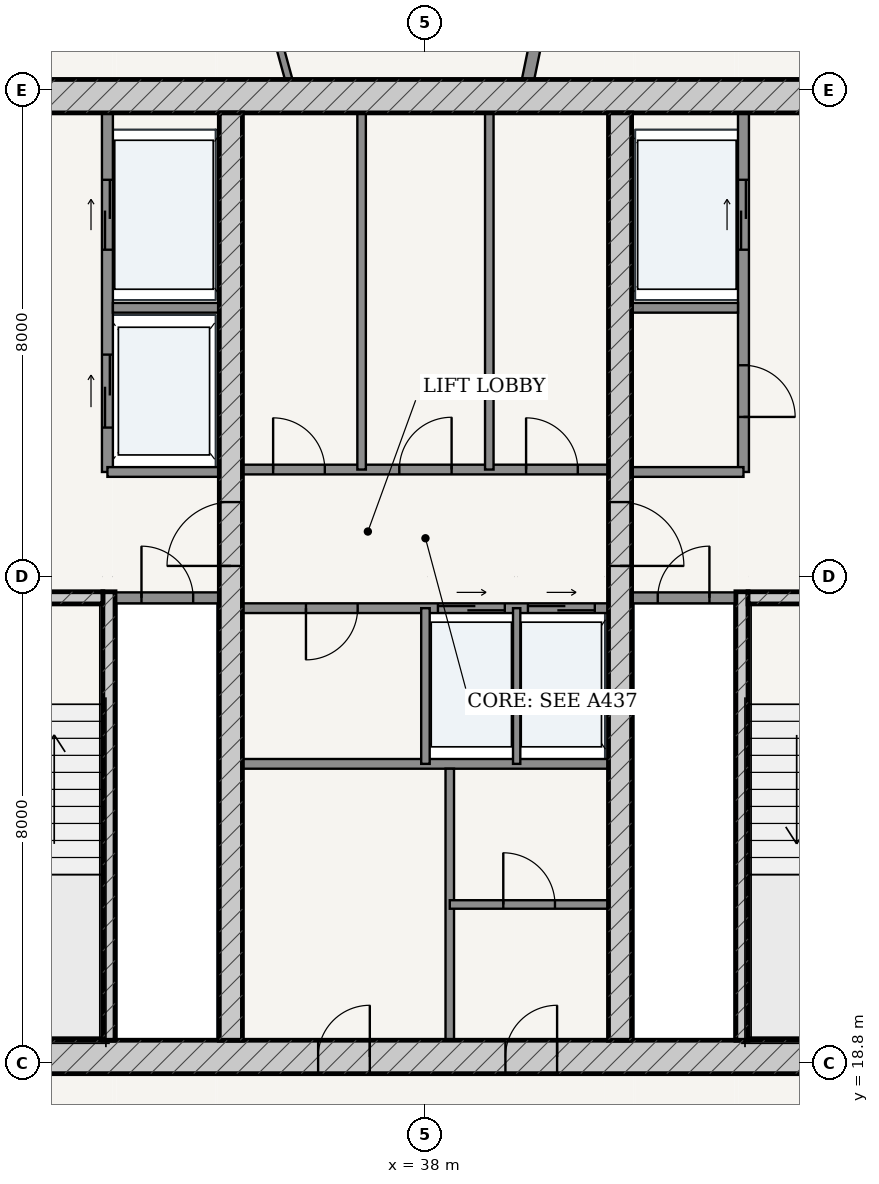
"""IFC4 building model, lengths in metres.
Left out: names, types, materials, properties, quantities, classifications, styles, units other than length and angle.
Written with IfcOpenShell. Run it as: python <this file> out.ifc"""

import sys

from ifc_helpers import new_model, si_unit, direction, frame, frame_2d, origin, place, context, subcontext, project, spatial, rectangle, extrude, source, transform, mapped, element, fill, save


model = new_model("IFC4")
c1 = context("Model", 3, precision=1e-05, world=origin(), true_north=direction((-0.2419218956, 0.970295726276)))
c2 = subcontext(c1, "Body", "Model", "MODEL_VIEW")
j1 = project(units=[si_unit("LENGTHUNIT", "METRE"), si_unit("PLANEANGLEUNIT", "RADIAN")], contexts=[c1])
p1 = place(None, origin())
s1 = spatial("IfcSite", under=j1, at=p1, CompositionType="ELEMENT")
p2 = place(p1, origin())
s2 = spatial("IfcBuilding", under=s1, at=p2, CompositionType="ELEMENT")
p3 = place(p2, frame((0.0, 0.0, 289.45)))
s3 = spatial("IfcBuildingStorey", under=s2, at=p3, CompositionType="ELEMENT", Elevation=289.45)
p4 = place(p3, frame((28.825, 18.9, 0.0), z_axis=(0.0, 0.0, 1.0), x_axis=(1.0, 0.0, 0.0)))
e1 = element("IfcWall", 1, at=p4, inside=s3, PredefinedType="SHEAR", context=c2, shape_type="SweptSolid", body=[
    extrude(rectangle(XDim=18.35, YDim=0.55, at=frame_2d((9.175, 0.0))), origin(), (0.0, 0.0, 1.0), 3.49),
])
p5 = place(p4, frame((7.41, 0.0, 0.0)))
e2 = element("IfcOpeningElement", 2, at=p5, cuts=e1, PredefinedType="OPENING", context=c2, shape_type="SweptSolid", body=[
    extrude(rectangle(XDim=0.85, YDim=2.1, at=frame_2d((0.425, 1.05))), frame((0.0, 0.285, 0.0), z_axis=(0.0, -1.0, 0.0), x_axis=(1.0, 0.0, 0.0)), (0.0, 0.0, 1.0), 0.57),
])
p6 = place(p4, frame((10.49, 0.0, 0.0)))
e3 = element("IfcOpeningElement", 3, at=p6, cuts=e1, PredefinedType="OPENING", context=c2, shape_type="SweptSolid", body=[
    extrude(rectangle(XDim=0.85, YDim=2.1, at=frame_2d((0.425, 1.05))), frame((0.0, 0.285, 0.0), z_axis=(0.0, -1.0, 0.0), x_axis=(1.0, 0.0, 0.0)), (0.0, 0.0, 1.0), 0.57),
])
p7 = place(p3, frame((28.825, 34.7, 0.0), z_axis=(0.0, 0.0, 1.0), x_axis=(1.0, 0.0, 0.0)))
e4 = element("IfcWall", 4, at=p7, inside=s3, PredefinedType="SHEAR", context=c2, shape_type="SweptSolid", body=[
    extrude(rectangle(XDim=18.35, YDim=0.55, at=frame_2d((9.175, 0.0))), origin(), (0.0, 0.0, 1.0), 3.49),
])
p8 = place(p3, frame((32.795, 19.175, 0.0), z_axis=(0.0, 0.0, 1.0), x_axis=(0.0, 1.0, 0.0)))
e5 = element("IfcWall", 5, at=p8, inside=s3, PredefinedType="SOLIDWALL", context=c2, shape_type="SweptSolid", body=[
    extrude(rectangle(XDim=7.375, YDim=0.2, at=frame_2d((3.688, 0.0))), origin(), (0.0, 0.0, 1.0), 3.49),
])
p9 = place(p3, frame((29.375, 26.45, 0.0), z_axis=(0.0, 0.0, 1.0), x_axis=(1.0, 0.0, 0.0)))
e6 = element("IfcWall", 6, at=p9, inside=s3, PredefinedType="SOLIDWALL", context=c2, shape_type="SweptSolid", body=[
    extrude(rectangle(XDim=3.32, YDim=0.2, at=frame_2d((1.66, 0.0))), origin(), (0.0, 0.0, 1.0), 3.49),
])
p10 = place(p9, frame((1.185, 0.0, 0.0)))
e7 = element("IfcOpeningElement", 7, at=p10, cuts=e6, PredefinedType="OPENING", context=c2, shape_type="SweptSolid", body=[
    extrude(rectangle(XDim=0.95, YDim=2.15, at=frame_2d((0.475, 1.075))), frame((0.0, 0.11, 0.0), z_axis=(0.0, -1.0, 0.0), x_axis=(1.0, 0.0, 0.0)), (0.0, 0.0, 1.0), 0.22),
])
p11 = place(p3, frame((43.205, 19.175, 0.0), z_axis=(0.0, 0.0, 1.0), x_axis=(0.0, 1.0, 0.0)))
e8 = element("IfcWall", 8, at=p11, inside=s3, PredefinedType="SOLIDWALL", context=c2, shape_type="SweptSolid", body=[
    extrude(rectangle(XDim=7.375, YDim=0.2, at=frame_2d((3.688, 0.0))), origin(), (0.0, 0.0, 1.0), 3.49),
])
p12 = place(p3, frame((43.305, 26.45, 0.0), z_axis=(0.0, 0.0, 1.0), x_axis=(1.0, 0.0, 0.0)))
e9 = element("IfcWall", 9, at=p12, inside=s3, PredefinedType="SOLIDWALL", context=c2, shape_type="SweptSolid", body=[
    extrude(rectangle(XDim=3.32, YDim=0.2, at=frame_2d((1.66, 0.0))), origin(), (0.0, 0.0, 1.0), 3.49),
])
p13 = place(p12, frame((1.185, 0.0, 0.0)))
e10 = element("IfcOpeningElement", 10, at=p13, cuts=e9, PredefinedType="OPENING", context=c2, shape_type="SweptSolid", body=[
    extrude(rectangle(XDim=0.95, YDim=2.15, at=frame_2d((0.475, 1.075))), frame((0.0, 0.11, 0.0), z_axis=(0.0, -1.0, 0.0), x_axis=(1.0, 0.0, 0.0)), (0.0, 0.0, 1.0), 0.22),
])
p14 = place(p3, frame((34.8, 19.175, 0.0), z_axis=(0.0, 0.0, 1.0), x_axis=(0.0, 1.0, 0.0)))
e11 = element("IfcWall", 11, at=p14, inside=s3, PredefinedType="SHEAR", context=c2, shape_type="SweptSolid", body=[
    extrude(rectangle(XDim=15.25, YDim=0.38, at=frame_2d((7.625, 0.0))), origin(), (0.0, 0.0, 1.0), 3.49),
])
p15 = place(p14, frame((7.8, 0.0, 0.0)))
e12 = element("IfcOpeningElement", 12, at=p15, cuts=e11, PredefinedType="OPENING", context=c2, shape_type="SweptSolid", body=[
    extrude(rectangle(XDim=1.05, YDim=2.15, at=frame_2d((0.525, 1.075))), frame((0.0, 0.2, 0.0), z_axis=(0.0, -1.0, 0.0), x_axis=(1.0, 0.0, 0.0)), (0.0, 0.0, 1.0), 0.4),
])
p16 = place(p3, frame((41.2, 19.175, 0.0), z_axis=(0.0, 0.0, 1.0), x_axis=(0.0, 1.0, 0.0)))
e13 = element("IfcWall", 13, at=p16, inside=s3, PredefinedType="SHEAR", context=c2, shape_type="SweptSolid", body=[
    extrude(rectangle(XDim=15.25, YDim=0.38, at=frame_2d((7.625, 0.0))), origin(), (0.0, 0.0, 1.0), 3.49),
])
p17 = place(p16, frame((7.8, 0.0, 0.0)))
e14 = element("IfcOpeningElement", 14, at=p17, cuts=e13, PredefinedType="OPENING", context=c2, shape_type="SweptSolid", body=[
    extrude(rectangle(XDim=1.05, YDim=2.15, at=frame_2d((0.525, 1.075))), frame((0.0, 0.2, 0.0), z_axis=(0.0, -1.0, 0.0), x_axis=(1.0, 0.0, 0.0)), (0.0, 0.0, 1.0), 0.4),
])
p18 = place(p3, frame((32.9, 26.45, 0.0), z_axis=(0.0, 0.0, 1.0), x_axis=(1.0, 0.0, 0.0)))
e15 = element("IfcWall", 15, at=p18, inside=s3, PredefinedType="PARTITIONING", context=c2, shape_type="SweptSolid", body=[
    extrude(rectangle(XDim=1.71, YDim=0.18, at=frame_2d((0.855, 0.0))), origin(), (0.0, 0.0, 1.0), 3.49),
])
p19 = place(p18, frame((0.43, 0.0, 0.0)))
e16 = element("IfcOpeningElement", 16, at=p19, cuts=e15, PredefinedType="OPENING", context=c2, shape_type="SweptSolid", body=[
    extrude(rectangle(XDim=0.85, YDim=2.1, at=frame_2d((0.425, 1.05))), frame((0.0, 0.1, 0.0), z_axis=(0.0, -1.0, 0.0), x_axis=(1.0, 0.0, 0.0)), (0.0, 0.0, 1.0), 0.2),
])
p20 = place(p3, frame((41.39, 26.45, 0.0), z_axis=(0.0, 0.0, 1.0), x_axis=(1.0, 0.0, 0.0)))
e17 = element("IfcWall", 17, at=p20, inside=s3, PredefinedType="PARTITIONING", context=c2, shape_type="SweptSolid", body=[
    extrude(rectangle(XDim=1.71, YDim=0.18, at=frame_2d((0.855, 0.0))), origin(), (0.0, 0.0, 1.0), 3.49),
])
p21 = place(p20, frame((0.43, 0.0, 0.0)))
e18 = element("IfcOpeningElement", 18, at=p21, cuts=e17, PredefinedType="OPENING", context=c2, shape_type="SweptSolid", body=[
    extrude(rectangle(XDim=0.85, YDim=2.1, at=frame_2d((0.425, 1.05))), frame((0.0, 0.1, 0.0), z_axis=(0.0, -1.0, 0.0), x_axis=(1.0, 0.0, 0.0)), (0.0, 0.0, 1.0), 0.2),
])
p22 = place(p3, frame((32.77, 28.52, 0.0), z_axis=(0.0, 0.0, 1.0), x_axis=(0.0, 1.0, 0.0)))
e19 = element("IfcWall", 19, at=p22, inside=s3, PredefinedType="PARTITIONING", context=c2, shape_type="SweptSolid", body=[
    extrude(rectangle(XDim=5.905, YDim=0.18, at=frame_2d((2.953, 0.0))), origin(), (0.0, 0.0, 1.0), 3.49),
])
p23 = place(p22, frame((3.655, 0.0, 0.0)))
e20 = element("IfcOpeningElement", 20, at=p23, cuts=e19, PredefinedType="OPENING", context=c2, shape_type="SweptSolid", body=[
    extrude(rectangle(XDim=1.15, YDim=2.2, at=frame_2d((0.575, 1.1))), frame((0.0, 0.1, 0.0), z_axis=(0.0, -1.0, 0.0), x_axis=(1.0, 0.0, 0.0)), (0.0, 0.0, 1.0), 0.2),
])
p24 = place(p22, frame((0.73, 0.0, 0.0)))
e21 = element("IfcOpeningElement", 21, at=p24, cuts=e19, PredefinedType="OPENING", context=c2, shape_type="SweptSolid", body=[
    extrude(rectangle(XDim=1.2, YDim=2.25, at=frame_2d((0.6, 1.125))), frame((0.0, 0.1, 0.0), z_axis=(0.0, -1.0, 0.0), x_axis=(1.0, 0.0, 0.0)), (0.0, 0.0, 1.0), 0.2),
])
p25 = place(p3, frame((32.86, 31.22, 0.0), z_axis=(0.0, 0.0, 1.0), x_axis=(1.0, 0.0, 0.0)))
e22 = element("IfcWall", 22, at=p25, inside=s3, PredefinedType="PARTITIONING", context=c2, shape_type="SweptSolid", body=[
    extrude(rectangle(XDim=1.75, YDim=0.16, at=frame_2d((0.875, 0.0))), origin(), (0.0, 0.0, 1.0), 3.49),
])
p26 = place(p3, frame((32.77, 28.52, 0.0), z_axis=(0.0, 0.0, 1.0), x_axis=(1.0, 0.0, 0.0)))
e23 = element("IfcWall", 23, at=p26, inside=s3, PredefinedType="PARTITIONING", context=c2, shape_type="SweptSolid", body=[
    extrude(rectangle(XDim=1.84, YDim=0.16, at=frame_2d((0.92, 0.0))), origin(), (0.0, 0.0, 1.0), 3.49),
])
p27 = place(p3, frame((43.23, 28.52, 0.0), z_axis=(0.0, 0.0, 1.0), x_axis=(0.0, 1.0, 0.0)))
e24 = element("IfcWall", 24, at=p27, inside=s3, PredefinedType="PARTITIONING", context=c2, shape_type="SweptSolid", body=[
    extrude(rectangle(XDim=5.905, YDim=0.18, at=frame_2d((2.953, 0.0))), origin(), (0.0, 0.0, 1.0), 3.49),
])
p28 = place(p27, frame((0.905, 0.0, 0.0)))
e25 = element("IfcOpeningElement", 25, at=p28, cuts=e24, PredefinedType="OPENING", context=c2, shape_type="SweptSolid", body=[
    extrude(rectangle(XDim=0.85, YDim=2.1, at=frame_2d((0.425, 1.05))), frame((0.0, 0.1, 0.0), z_axis=(0.0, -1.0, 0.0), x_axis=(1.0, 0.0, 0.0)), (0.0, 0.0, 1.0), 0.2),
])
p29 = place(p27, frame((3.655, 0.0, 0.0)))
e26 = element("IfcOpeningElement", 26, at=p29, cuts=e24, PredefinedType="OPENING", context=c2, shape_type="SweptSolid", body=[
    extrude(rectangle(XDim=1.15, YDim=2.2, at=frame_2d((0.575, 1.1))), frame((0.0, 0.1, 0.0), z_axis=(0.0, -1.0, 0.0), x_axis=(1.0, 0.0, 0.0)), (0.0, 0.0, 1.0), 0.2),
])
p30 = place(p3, frame((41.39, 31.22, 0.0), z_axis=(0.0, 0.0, 1.0), x_axis=(1.0, 0.0, 0.0)))
e27 = element("IfcWall", 27, at=p30, inside=s3, PredefinedType="PARTITIONING", context=c2, shape_type="SweptSolid", body=[
    extrude(rectangle(XDim=1.75, YDim=0.16, at=frame_2d((0.875, 0.0))), origin(), (0.0, 0.0, 1.0), 3.49),
])
p31 = place(p3, frame((41.39, 28.52, 0.0), z_axis=(0.0, 0.0, 1.0), x_axis=(1.0, 0.0, 0.0)))
e28 = element("IfcWall", 28, at=p31, inside=s3, PredefinedType="PARTITIONING", context=c2, shape_type="SweptSolid", body=[
    extrude(rectangle(XDim=1.84, YDim=0.16, at=frame_2d((0.92, 0.0))), origin(), (0.0, 0.0, 1.0), 3.49),
])
p32 = place(p3, frame((34.99, 28.56, 0.0), z_axis=(0.0, 0.0, 1.0), x_axis=(1.0, 0.0, 0.0)))
e29 = element("IfcWall", 29, at=p32, inside=s3, PredefinedType="PARTITIONING", context=c2, shape_type="SweptSolid", body=[
    extrude(rectangle(XDim=6.02, YDim=0.16, at=frame_2d((3.01, 0.0))), origin(), (0.0, 0.0, 1.0), 3.49),
])
p33 = place(p32, frame((0.505, 0.0, 0.0)))
e30 = element("IfcOpeningElement", 30, at=p33, cuts=e29, PredefinedType="OPENING", context=c2, shape_type="SweptSolid", body=[
    extrude(rectangle(XDim=0.85, YDim=2.1, at=frame_2d((0.425, 1.05))), frame((0.0, 0.09, 0.0), z_axis=(0.0, -1.0, 0.0), x_axis=(1.0, 0.0, 0.0)), (0.0, 0.0, 1.0), 0.18),
])
p34 = place(p32, frame((2.58, 0.0, 0.0)))
e31 = element("IfcOpeningElement", 31, at=p34, cuts=e29, PredefinedType="OPENING", context=c2, shape_type="SweptSolid", body=[
    extrude(rectangle(XDim=0.86, YDim=2.1, at=frame_2d((0.43, 1.05))), frame((0.0, 0.09, 0.0), z_axis=(0.0, -1.0, 0.0), x_axis=(1.0, 0.0, 0.0)), (0.0, 0.0, 1.0), 0.18),
])
p35 = place(p32, frame((4.665, 0.0, 0.0)))
e32 = element("IfcOpeningElement", 32, at=p35, cuts=e29, PredefinedType="OPENING", context=c2, shape_type="SweptSolid", body=[
    extrude(rectangle(XDim=0.85, YDim=2.1, at=frame_2d((0.425, 1.05))), frame((0.0, 0.09, 0.0), z_axis=(0.0, -1.0, 0.0), x_axis=(1.0, 0.0, 0.0)), (0.0, 0.0, 1.0), 0.18),
])
for number, where, z_axis, x_axis in (
    (33, (36.95, 28.56, 0.0), (0.0, 0.0, 1.0), (0.0, 1.0, 0.0)),
    (34, (39.05, 28.56, 0.0), (0.0, 0.0, 1.0), (0.0, 1.0, 0.0)),
):
    element("IfcWall", number, at=place(p3, frame(where, z_axis=z_axis, x_axis=x_axis)), inside=s3, PredefinedType="PARTITIONING", context=c2, shape_type="SweptSolid", body=[
        extrude(rectangle(XDim=5.865, YDim=0.14, at=frame_2d((2.933, 0.0))), origin(), (0.0, 0.0, 1.0), 3.49),
    ])
p36 = place(p3, frame((34.99, 26.28, 0.0), z_axis=(0.0, 0.0, 1.0), x_axis=(1.0, 0.0, 0.0)))
e35 = element("IfcWall", 35, at=p36, inside=s3, PredefinedType="PARTITIONING", context=c2, shape_type="SweptSolid", body=[
    extrude(rectangle(XDim=6.02, YDim=0.16, at=frame_2d((3.01, 0.0))), origin(), (0.0, 0.0, 1.0), 3.49),
])
p37 = place(p36, frame((1.045, 0.0, 0.0)))
e36 = element("IfcOpeningElement", 36, at=p37, cuts=e35, PredefinedType="OPENING", context=c2, shape_type="SweptSolid", body=[
    extrude(rectangle(XDim=0.85, YDim=2.1, at=frame_2d((0.425, 1.05))), frame((0.0, 0.09, 0.0), z_axis=(0.0, -1.0, 0.0), x_axis=(1.0, 0.0, 0.0)), (0.0, 0.0, 1.0), 0.18),
])
p38 = place(p36, frame((3.215, 0.0, 0.0)))
e37 = element("IfcOpeningElement", 37, at=p38, cuts=e35, PredefinedType="OPENING", context=c2, shape_type="SweptSolid", body=[
    extrude(rectangle(XDim=1.1, YDim=2.2, at=frame_2d((0.55, 1.1))), frame((0.0, 0.09, 0.0), z_axis=(0.0, -1.0, 0.0), x_axis=(1.0, 0.0, 0.0)), (0.0, 0.0, 1.0), 0.18),
])
p39 = place(p36, frame((4.695, 0.0, 0.0)))
e38 = element("IfcOpeningElement", 38, at=p39, cuts=e35, PredefinedType="OPENING", context=c2, shape_type="SweptSolid", body=[
    extrude(rectangle(XDim=1.1, YDim=2.2, at=frame_2d((0.55, 1.1))), frame((0.0, 0.09, 0.0), z_axis=(0.0, -1.0, 0.0), x_axis=(1.0, 0.0, 0.0)), (0.0, 0.0, 1.0), 0.18),
])
p40 = place(p3, frame((34.99, 23.72, 0.0), z_axis=(0.0, 0.0, 1.0), x_axis=(1.0, 0.0, 0.0)))
e39 = element("IfcWall", 39, at=p40, inside=s3, PredefinedType="PARTITIONING", context=c2, shape_type="SweptSolid", body=[
    extrude(rectangle(XDim=6.02, YDim=0.16, at=frame_2d((3.01, 0.0))), origin(), (0.0, 0.0, 1.0), 3.49),
])
p41 = place(p3, frame((38.0, 23.72, 0.0), z_axis=(0.0, 0.0, 1.0), x_axis=(0.0, 1.0, 0.0)))
e40 = element("IfcWall", 40, at=p41, inside=s3, PredefinedType="PARTITIONING", context=c2, shape_type="SweptSolid", body=[
    extrude(rectangle(XDim=2.56, YDim=0.14, at=frame_2d((1.28, 0.0))), origin(), (0.0, 0.0, 1.0), 3.49),
])
p42 = place(p3, frame((39.5, 23.72, 0.0), z_axis=(0.0, 0.0, 1.0), x_axis=(0.0, 1.0, 0.0)))
e41 = element("IfcWall", 41, at=p42, inside=s3, PredefinedType="PARTITIONING", context=c2, shape_type="SweptSolid", body=[
    extrude(rectangle(XDim=2.56, YDim=0.12, at=frame_2d((1.28, 0.0))), origin(), (0.0, 0.0, 1.0), 3.49),
])
p43 = place(p3, frame((38.4, 19.175, 0.0), z_axis=(0.0, 0.0, 1.0), x_axis=(0.0, 1.0, 0.0)))
e42 = element("IfcWall", 42, at=p43, inside=s3, PredefinedType="PARTITIONING", context=c2, shape_type="SweptSolid", body=[
    extrude(rectangle(XDim=4.465, YDim=0.14, at=frame_2d((2.232, 0.0))), origin(), (0.0, 0.0, 1.0), 3.49),
])
p44 = place(p3, frame((38.4, 21.407, 0.0), z_axis=(0.0, 0.0, 1.0), x_axis=(1.0, 0.0, 0.0)))
e43 = element("IfcWall", 43, at=p44, inside=s3, PredefinedType="PARTITIONING", context=c2, shape_type="SweptSolid", body=[
    extrude(rectangle(XDim=2.61, YDim=0.14, at=frame_2d((1.305, 0.0))), origin(), (0.0, 0.0, 1.0), 3.49),
])
p45 = place(p44, frame((0.88, 0.0, 0.0)))
e44 = element("IfcOpeningElement", 44, at=p45, cuts=e43, PredefinedType="OPENING", context=c2, shape_type="SweptSolid", body=[
    extrude(rectangle(XDim=0.85, YDim=2.1, at=frame_2d((0.425, 1.05))), frame((0.0, 0.08, 0.0), z_axis=(0.0, -1.0, 0.0), x_axis=(1.0, 0.0, 0.0)), (0.0, 0.0, 1.0), 0.16),
])
p46 = place(p3, frame((39.688, 34.977, 0.0), z_axis=(0.0, 0.0, 1.0), x_axis=(0.202091890364, 0.979366564596, 0.0)))
e45 = element("IfcWall", 45, at=p46, inside=s3, PredefinedType="PARTITIONING", context=c2, shape_type="SweptSolid", body=[
    extrude(rectangle(XDim=10.278, YDim=0.2, at=frame_2d((5.139, 0.0))), origin(), (0.0, 0.0, 1.0), 2.575),
])
p47 = place(p3, frame((35.751, 34.977, 0.0), z_axis=(0.0, 0.0, 1.0), x_axis=(-0.26521778697, 0.964188532122, 0.0)))
e46 = element("IfcWall", 46, at=p47, inside=s3, PredefinedType="PARTITIONING", context=c2, shape_type="SweptSolid", body=[
    extrude(rectangle(XDim=2.684, YDim=0.12, at=frame_2d((1.342, 0.0))), origin(), (0.0, 0.0, 1.0), 2.575),
])
m1 = source(origin(), c2, "Body", "SweptSolid", [
    extrude(rectangle(XDim=1.05, YDim=2.15, at=frame_2d((0.525, 1.075))), frame((0.0, 0.025, 0.0), z_axis=(0.0, -1.0, 0.0), x_axis=(1.0, 0.0, 0.0)), (0.0, 0.0, 1.0), 0.05),
])
p48 = place(p15, origin())
e47 = element("IfcDoor", 47, at=p48, inside=s3, OperationType="SINGLE_SWING_LEFT", PredefinedType="DOOR", context=c2, shape_type="MappedRepresentation", body=[
    mapped(m1, transform((0.0, 0.0, 0.0), scale=1.0)),
])
fill(e12, e47)
p49 = place(p17, frame((1.05, 0.0, 0.0), z_axis=(0.0, 0.0, 1.0), x_axis=(-1.0, 0.0, 0.0)))
e48 = element("IfcDoor", 48, at=p49, inside=s3, OperationType="SINGLE_SWING_RIGHT", PredefinedType="DOOR", context=c2, shape_type="MappedRepresentation", body=[
    mapped(m1, transform((0.0, 0.0, 0.0), scale=1.0)),
])
fill(e14, e48)
m2 = source(origin(), c2, "Body", "SweptSolid", [
    extrude(rectangle(XDim=0.85, YDim=2.1, at=frame_2d((0.425, 1.05))), frame((0.0, 0.025, 0.0), z_axis=(0.0, -1.0, 0.0), x_axis=(1.0, 0.0, 0.0)), (0.0, 0.0, 1.0), 0.05),
])
p50 = place(p19, origin())
e49 = element("IfcDoor", 49, at=p50, inside=s3, OperationType="SINGLE_SWING_LEFT", PredefinedType="DOOR", context=c2, shape_type="MappedRepresentation", body=[
    mapped(m2, transform((0.0, 0.0, 0.0), scale=1.0)),
])
fill(e16, e49)
p51 = place(p21, origin())
e50 = element("IfcDoor", 50, at=p51, inside=s3, OperationType="SINGLE_SWING_RIGHT", PredefinedType="DOOR", context=c2, shape_type="MappedRepresentation", body=[
    mapped(m2, transform((0.0, 0.0, 0.0), scale=1.0)),
])
fill(e18, e50)
p52 = place(p28, frame((0.85, 0.0, 0.0), z_axis=(0.0, 0.0, 1.0), x_axis=(-1.0, 0.0, 0.0)))
e51 = element("IfcDoor", 51, at=p52, inside=s3, OperationType="SINGLE_SWING_RIGHT", PredefinedType="DOOR", context=c2, shape_type="MappedRepresentation", body=[
    mapped(m2, transform((0.0, 0.0, 0.0), scale=1.0)),
])
fill(e25, e51)
p53 = place(p33, origin())
e52 = element("IfcDoor", 52, at=p53, inside=s3, OperationType="SINGLE_SWING_LEFT", PredefinedType="DOOR", context=c2, shape_type="MappedRepresentation", body=[
    mapped(m2, transform((0.0, 0.0, 0.0), scale=1.0)),
])
fill(e30, e52)
m3 = source(origin(), c2, "Body", "SweptSolid", [
    extrude(rectangle(XDim=0.86, YDim=2.1, at=frame_2d((0.43, 1.05))), frame((0.0, 0.025, 0.0), z_axis=(0.0, -1.0, 0.0), x_axis=(1.0, 0.0, 0.0)), (0.0, 0.0, 1.0), 0.05),
])
p54 = place(p34, origin())
e53 = element("IfcDoor", 53, at=p54, inside=s3, OperationType="SINGLE_SWING_RIGHT", PredefinedType="DOOR", context=c2, shape_type="MappedRepresentation", body=[
    mapped(m3, transform((0.0, 0.0, 0.0), scale=1.0)),
])
fill(e31, e53)
p55 = place(p35, origin())
e54 = element("IfcDoor", 54, at=p55, inside=s3, OperationType="SINGLE_SWING_LEFT", PredefinedType="DOOR", context=c2, shape_type="MappedRepresentation", body=[
    mapped(m2, transform((0.0, 0.0, 0.0), scale=1.0)),
])
fill(e32, e54)
p56 = place(p37, frame((0.85, 0.0, 0.0), z_axis=(0.0, 0.0, 1.0), x_axis=(-1.0, 0.0, 0.0)))
e55 = element("IfcDoor", 55, at=p56, inside=s3, OperationType="SINGLE_SWING_RIGHT", PredefinedType="DOOR", context=c2, shape_type="MappedRepresentation", body=[
    mapped(m2, transform((0.0, 0.0, 0.0), scale=1.0)),
])
fill(e36, e55)
p57 = place(p5, origin())
e56 = element("IfcDoor", 56, at=p57, inside=s3, OperationType="SINGLE_SWING_RIGHT", PredefinedType="DOOR", context=c2, shape_type="MappedRepresentation", body=[
    mapped(m2, transform((0.0, 0.0, 0.0), scale=1.0)),
])
fill(e2, e56)
p58 = place(p6, origin())
e57 = element("IfcDoor", 57, at=p58, inside=s3, OperationType="SINGLE_SWING_RIGHT", PredefinedType="DOOR", context=c2, shape_type="MappedRepresentation", body=[
    mapped(m2, transform((0.0, 0.0, 0.0), scale=1.0)),
])
fill(e3, e57)
p59 = place(p45, origin())
e58 = element("IfcDoor", 58, at=p59, inside=s3, OperationType="SINGLE_SWING_LEFT", PredefinedType="DOOR", context=c2, shape_type="MappedRepresentation", body=[
    mapped(m2, transform((0.0, 0.0, 0.0), scale=1.0)),
])
fill(e44, e58)
m4 = source(origin(), c2, "Body", "SweptSolid", [
    extrude(rectangle(XDim=1.15, YDim=2.2, at=frame_2d((0.575, 1.1))), frame((0.0, 0.025, 0.0), z_axis=(0.0, -1.0, 0.0), x_axis=(1.0, 0.0, 0.0)), (0.0, 0.0, 1.0), 0.05),
])
p60 = place(p23, origin())
e59 = element("IfcDoor", 59, at=p60, inside=s3, OperationType="DOUBLE_DOOR_SLIDING", PredefinedType="DOOR", context=c2, shape_type="MappedRepresentation", body=[
    mapped(m4, transform((0.0, 0.0, 0.0), scale=1.0)),
])
fill(e20, e59)
p61 = place(p29, origin())
e60 = element("IfcDoor", 60, at=p61, inside=s3, OperationType="DOUBLE_DOOR_SLIDING", PredefinedType="DOOR", context=c2, shape_type="MappedRepresentation", body=[
    mapped(m4, transform((0.0, 0.0, 0.0), scale=1.0)),
])
fill(e26, e60)
m5 = source(origin(), c2, "Body", "SweptSolid", [
    extrude(rectangle(XDim=1.2, YDim=2.25, at=frame_2d((0.6, 1.125))), frame((0.0, 0.025, 0.0), z_axis=(0.0, -1.0, 0.0), x_axis=(1.0, 0.0, 0.0)), (0.0, 0.0, 1.0), 0.05),
])
p62 = place(p24, origin())
e61 = element("IfcDoor", 61, at=p62, inside=s3, OperationType="DOUBLE_DOOR_SLIDING", PredefinedType="DOOR", context=c2, shape_type="MappedRepresentation", body=[
    mapped(m5, transform((0.0, 0.0, 0.0), scale=1.0)),
])
fill(e21, e61)
m6 = source(origin(), c2, "Body", "SweptSolid", [
    extrude(rectangle(XDim=1.1, YDim=2.2, at=frame_2d((0.55, 1.1))), frame((0.0, 0.025, 0.0), z_axis=(0.0, -1.0, 0.0), x_axis=(1.0, 0.0, 0.0)), (0.0, 0.0, 1.0), 0.05),
])
p63 = place(p38, origin())
e62 = element("IfcDoor", 62, at=p63, inside=s3, OperationType="DOUBLE_DOOR_SLIDING", PredefinedType="DOOR", context=c2, shape_type="MappedRepresentation", body=[
    mapped(m6, transform((0.0, 0.0, 0.0), scale=1.0)),
])
fill(e37, e62)
p64 = place(p39, origin())
e63 = element("IfcDoor", 63, at=p64, inside=s3, OperationType="DOUBLE_DOOR_SLIDING", PredefinedType="DOOR", context=c2, shape_type="MappedRepresentation", body=[
    mapped(m6, transform((0.0, 0.0, 0.0), scale=1.0)),
])
fill(e38, e63)
save(model, sys.argv[1])
